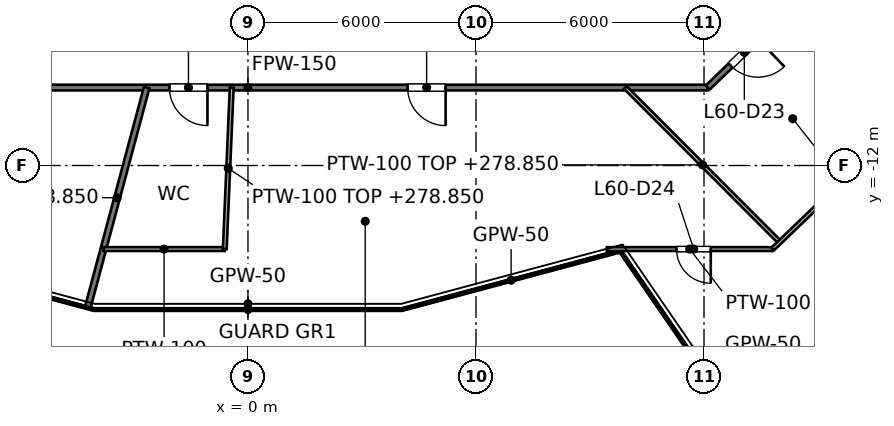
"""IFC4 building model, lengths in metres.
Left out: names, types, materials, properties, quantities, classifications, styles, units other than length and angle.
Written with IfcOpenShell. Run it as: python <this file> out.ifc"""

import sys

from ifc_helpers import new_model, si_unit, direction, frame, frame_2d, origin, place, context, subcontext, project, spatial, rectangle, extrude, element, fill, save


model = new_model("IFC4")
c1 = context("Model", 3, precision=1e-05, world=origin(), true_north=direction((0.0, 1.0)))
c2 = subcontext(c1, "Body", "Model", "MODEL_VIEW")
j1 = project(units=[si_unit("LENGTHUNIT", "METRE"), si_unit("PLANEANGLEUNIT", "RADIAN")], contexts=[c1])
p1 = place(None, origin())
s1 = spatial("IfcSite", under=j1, at=p1, CompositionType="ELEMENT")
p2 = place(p1, origin())
s2 = spatial("IfcBuilding", under=s1, at=p2, CompositionType="ELEMENT")
p3 = place(p2, frame((0.0, 0.0, 275.0)))
s3 = spatial("IfcBuildingStorey", under=s2, at=p3, CompositionType="ELEMENT", Elevation=275.0)
p4 = place(p3, frame((14.024, -8.097, 0.0), z_axis=(0.0, 0.0, 1.0), x_axis=(0.86601678782, -0.50001492299, 0.0)))
e1 = element("IfcWall", 1, at=p4, inside=s3, PredefinedType="PARTITIONING", context=c2, shape_type="SweptSolid", body=[
    extrude(rectangle(XDim=11.104, YDim=0.15, at=frame_2d((5.552, 0.0))), origin(), (0.0, 0.0, 1.0), 3.475),
])
p5 = place(p3, frame((-12.095, -9.949, 0.0), z_axis=(0.0, 0.0, 1.0), x_axis=(1.0, 0.0, 0.0)))
e2 = element("IfcWall", 2, at=p5, inside=s3, PredefinedType="PARTITIONING", context=c2, shape_type="SweptSolid", body=[
    extrude(rectangle(XDim=24.19, YDim=0.15, at=frame_2d((12.095, 0.0))), origin(), (0.0, 0.0, 1.0), 2.927),
])
p6 = place(p5, frame((4.215, 0.0, 0.0)))
e3 = element("IfcOpeningElement", 3, at=p6, cuts=e2, PredefinedType="OPENING", context=c2, shape_type="SweptSolid", body=[
    extrude(rectangle(XDim=1.0, YDim=2.1, at=frame_2d((0.5, 1.05))), frame((0.0, 0.075, 0.0), z_axis=(0.0, -1.0, 0.0), x_axis=(1.0, 0.0, 0.0)), (0.0, 0.0, 1.0), 0.15),
])
p7 = place(p5, frame((10.029, 0.0, 0.0)))
e4 = element("IfcOpeningElement", 4, at=p7, cuts=e2, PredefinedType="OPENING", context=c2, shape_type="SweptSolid", body=[
    extrude(rectangle(XDim=1.0, YDim=2.1, at=frame_2d((0.5, 1.05))), frame((0.0, 0.075, 0.0), z_axis=(0.0, -1.0, 0.0), x_axis=(1.0, 0.0, 0.0)), (0.0, 0.0, 1.0), 0.15),
])
p8 = place(p5, frame((16.297, 0.0, 0.0)))
e5 = element("IfcOpeningElement", 5, at=p8, cuts=e2, PredefinedType="OPENING", context=c2, shape_type="SweptSolid", body=[
    extrude(rectangle(XDim=1.0, YDim=2.1, at=frame_2d((0.5, 1.05))), frame((0.0, 0.075, 0.0), z_axis=(0.0, -1.0, 0.0), x_axis=(1.0, 0.0, 0.0)), (0.0, 0.0, 1.0), 0.15),
])
p9 = place(p3, frame((12.095, -9.949, 0.0), z_axis=(0.0, 0.0, 1.0), x_axis=(0.721290181137, 0.692633001376, 0.0)))
e6 = element("IfcWall", 6, at=p9, inside=s3, PredefinedType="PARTITIONING", context=c2, shape_type="SweptSolid", body=[
    extrude(rectangle(XDim=8.187, YDim=0.15, at=frame_2d((4.094, 0.0))), origin(), (0.0, 0.0, 1.0), 2.927),
])
p10 = place(p9, frame((0.839, 0.0, 0.0)))
e7 = element("IfcOpeningElement", 7, at=p10, cuts=e6, PredefinedType="OPENING", context=c2, shape_type="SweptSolid", body=[
    extrude(rectangle(XDim=1.0, YDim=2.1, at=frame_2d((0.5, 1.05))), frame((0.0, 0.075, 0.0), z_axis=(0.0, -1.0, 0.0), x_axis=(1.0, 0.0, 0.0)), (0.0, 0.0, 1.0), 0.15),
])
p11 = place(p3, frame((-4.219, -15.746, 0.0), z_axis=(0.0, 0.0, 1.0), x_axis=(0.258763874674, 0.965940607472, 0.0)))
e8 = element("IfcWall", 8, at=p11, inside=s3, PredefinedType="PARTITIONING", context=c2, shape_type="SweptSolid", body=[
    extrude(rectangle(XDim=6.001, YDim=0.15, at=frame_2d((3.001, 0.0))), origin(), (0.0, 0.0, 1.0), 3.85),
])
p12 = place(p3, frame((9.797, -14.251, 0.0), z_axis=(0.0, 0.0, 1.0), x_axis=(0.566456270614, -0.824091799184, 0.0)))
e9 = element("IfcWall", 9, at=p12, inside=s3, PredefinedType="PARTITIONING", context=c2, shape_type="SweptSolid", body=[
    extrude(rectangle(XDim=7.427, YDim=0.05, at=frame_2d((3.713, 0.0))), origin(), (0.0, 0.0, 1.0), 2.927),
])
p13 = place(p3, frame((-11.302, -13.848, 0.0), z_axis=(0.0, 0.0, 1.0), x_axis=(0.966071658889, -0.258274175814, 0.0)))
e10 = element("IfcWall", 10, at=p13, inside=s3, PredefinedType="PARTITIONING", context=c2, shape_type="SweptSolid", body=[
    extrude(rectangle(XDim=7.504, YDim=0.05, at=frame_2d((3.752, 0.0))), origin(), (0.0, 0.0, 1.0), 2.927),
])
p14 = place(p3, frame((-4.054, -15.79, 0.0), z_axis=(0.0, 0.0, 1.0), x_axis=(1.0, 0.0, 0.0)))
e11 = element("IfcWall", 11, at=p14, inside=s3, PredefinedType="PARTITIONING", context=c2, shape_type="SweptSolid", body=[
    extrude(rectangle(XDim=8.108, YDim=0.05, at=frame_2d((4.054, 0.0))), origin(), (0.0, 0.0, 1.0), 2.927),
])
p15 = place(p3, frame((4.054, -15.79, 0.0), z_axis=(0.0, 0.0, 1.0), x_axis=(0.965719156344, 0.259589119708, 0.0)))
e12 = element("IfcWall", 12, at=p15, inside=s3, PredefinedType="PARTITIONING", context=c2, shape_type="SweptSolid", body=[
    extrude(rectangle(XDim=5.946, YDim=0.05, at=frame_2d((2.973, 0.0))), origin(), (0.0, 0.0, 1.0), 2.927),
])
p16 = place(p3, frame((9.931, -9.949, 0.0), z_axis=(0.0, 0.0, 1.0), x_axis=(0.706405887394, -0.707806980932, 0.0)))
e13 = element("IfcWall", 13, at=p16, inside=s3, PredefinedType="PARTITIONING", context=c2, shape_type="SweptSolid", body=[
    extrude(rectangle(XDim=5.75, YDim=0.1, at=frame_2d((2.875, 0.0))), origin(), (0.0, 0.0, 1.0), 3.85),
])
p17 = place(p3, frame((-3.805, -14.199, 0.0), z_axis=(0.0, 0.0, 1.0), x_axis=(1.0, 0.0, 0.0)))
e14 = element("IfcWall", 14, at=p17, inside=s3, PredefinedType="PARTITIONING", context=c2, shape_type="SweptSolid", body=[
    extrude(rectangle(XDim=3.195, YDim=0.1, at=frame_2d((1.597, 0.0))), origin(), (0.0, 0.0, 1.0), 2.927),
])
p18 = place(p3, frame((9.445, -14.199, 0.0), z_axis=(0.0, 0.0, 1.0), x_axis=(1.0, 0.0, 0.0)))
e15 = element("IfcWall", 15, at=p18, inside=s3, PredefinedType="PARTITIONING", context=c2, shape_type="SweptSolid", body=[
    extrude(rectangle(XDim=4.36, YDim=0.1, at=frame_2d((2.18, 0.0))), origin(), (0.0, 0.0, 1.0), 2.927),
])
p19 = place(p18, frame((1.833, 0.0, 0.0)))
e16 = element("IfcOpeningElement", 16, at=p19, cuts=e15, PredefinedType="OPENING", context=c2, shape_type="SweptSolid", body=[
    extrude(rectangle(XDim=0.9, YDim=2.1, at=frame_2d((0.45, 1.05))), frame((0.0, 0.05, 0.0), z_axis=(0.0, -1.0, 0.0), x_axis=(1.0, 0.0, 0.0)), (0.0, 0.0, 1.0), 0.1),
])
p20 = place(p3, frame((13.805, -14.199, 0.0), z_axis=(0.0, 0.0, 1.0), x_axis=(0.721439820897, 0.69247713668, 0.0)))
e17 = element("IfcWall", 17, at=p20, inside=s3, PredefinedType="PARTITIONING", context=c2, shape_type="SweptSolid", body=[
    extrude(rectangle(XDim=11.708, YDim=0.1, at=frame_2d((5.854, 0.0))), origin(), (0.0, 0.0, 1.0), 2.927),
])
p21 = place(p3, frame((-0.61, -14.199, 0.0), z_axis=(0.0, 0.0, 1.0), x_axis=(0.04304370936, 0.999073190054, 0.0)))
e18 = element("IfcWall", 18, at=p21, inside=s3, PredefinedType="PARTITIONING", context=c2, shape_type="SweptSolid", body=[
    extrude(rectangle(XDim=4.254, YDim=0.1, at=frame_2d((2.127, 0.0))), origin(), (0.0, 0.0, 1.0), 3.85),
])
p22 = place(p7, origin())
e19 = element("IfcDoor", 19, at=p22, inside=s3, OperationType="SINGLE_SWING_RIGHT", PredefinedType="DOOR", context=c2, shape_type="SweptSolid", body=[
    extrude(rectangle(XDim=1.0, YDim=2.1, at=frame_2d((0.5, 1.05))), frame((0.0, 0.025, 0.0), z_axis=(0.0, -1.0, 0.0), x_axis=(1.0, 0.0, 0.0)), (0.0, 0.0, 1.0), 0.05),
])
fill(e4, e19)
p23 = place(p8, origin())
e20 = element("IfcDoor", 20, at=p23, inside=s3, OperationType="SINGLE_SWING_RIGHT", PredefinedType="DOOR", context=c2, shape_type="SweptSolid", body=[
    extrude(rectangle(XDim=1.0, YDim=2.1, at=frame_2d((0.5, 1.05))), frame((0.0, 0.025, 0.0), z_axis=(0.0, -1.0, 0.0), x_axis=(1.0, 0.0, 0.0)), (0.0, 0.0, 1.0), 0.05),
])
fill(e5, e20)
p24 = place(p10, origin())
e21 = element("IfcDoor", 21, at=p24, inside=s3, OperationType="SINGLE_SWING_RIGHT", PredefinedType="DOOR", context=c2, shape_type="SweptSolid", body=[
    extrude(rectangle(XDim=1.0, YDim=2.1, at=frame_2d((0.5, 1.05))), frame((0.0, 0.025, 0.0), z_axis=(0.0, -1.0, 0.0), x_axis=(1.0, 0.0, 0.0)), (0.0, 0.0, 1.0), 0.05),
])
fill(e7, e21)
p25 = place(p19, origin())
e22 = element("IfcDoor", 22, at=p25, inside=s3, OperationType="SINGLE_SWING_RIGHT", PredefinedType="DOOR", context=c2, shape_type="SweptSolid", body=[
    extrude(rectangle(XDim=0.9, YDim=2.1, at=frame_2d((0.45, 1.05))), frame((0.0, 0.025, 0.0), z_axis=(0.0, -1.0, 0.0), x_axis=(1.0, 0.0, 0.0)), (0.0, 0.0, 1.0), 0.05),
])
fill(e16, e22)
save(model, sys.argv[1])
